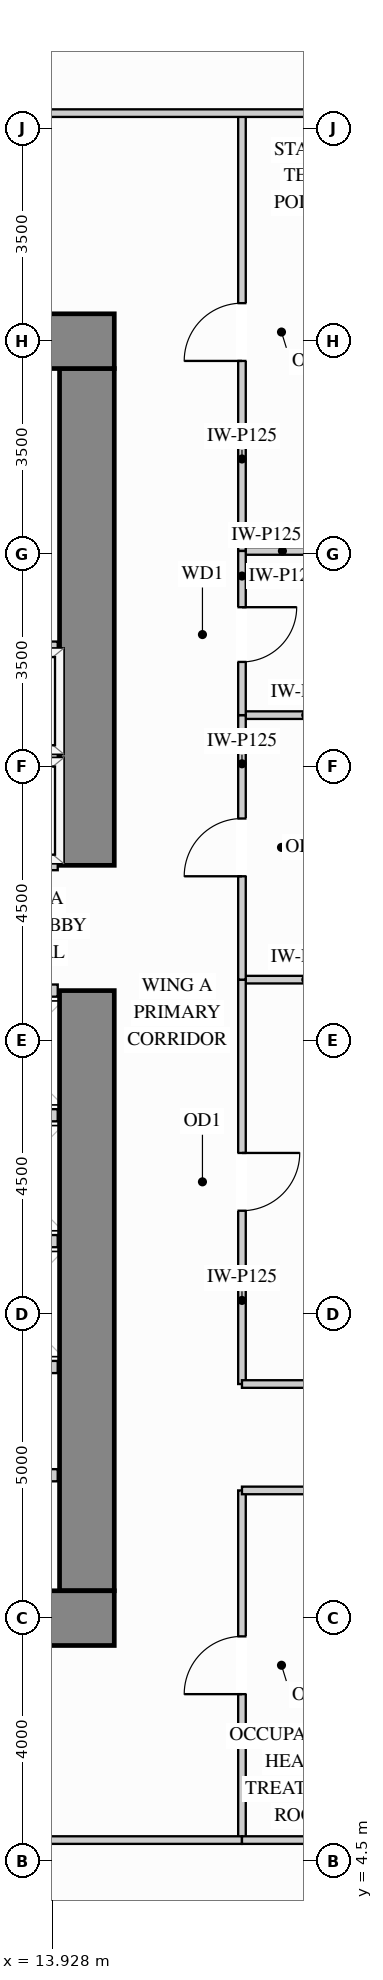
"""IFC4 building model, lengths in metres.
Left out: names, types, materials, properties, quantities, classifications, styles, units other than length and angle.
Written with IfcOpenShell. Run it as: python <this file> out.ifc"""

import sys

from ifc_helpers import new_model, si_unit, direction, frame, frame_2d, origin, place, context, subcontext, project, spatial, rectangle, extrude, source, transform, mapped, element, fill, save


model = new_model("IFC4")
c1 = context("Model", 3, precision=1e-05, world=origin(), true_north=direction((0.0, 1.0)))
c2 = subcontext(c1, "Body", "Model", "MODEL_VIEW")
j1 = project(units=[si_unit("LENGTHUNIT", "METRE"), si_unit("PLANEANGLEUNIT", "RADIAN")], contexts=[c1])
p1 = place(None, origin())
s1 = spatial("IfcSite", under=j1, at=p1, CompositionType="ELEMENT")
p2 = place(p1, origin())
s2 = spatial("IfcBuilding", under=s1, at=p2, CompositionType="ELEMENT")
p3 = place(p2, frame((0.0, 0.0, 54.9)))
s3 = spatial("IfcBuildingStorey", under=s2, at=p3, CompositionType="ELEMENT", Elevation=54.9)
m1 = source(origin(), c2, "Body", "SweptSolid", [
    extrude(rectangle(XDim=9.87, YDim=0.9, at=frame_2d((4.935, 0.0))), origin(), (0.0, 0.0, 1.0), 3.38),
])
p4 = place(p3, frame((14.5, 8.95, 0.0), z_axis=(0.0, 0.0, 1.0), x_axis=(0.0, 1.0, 0.0)))
e1 = element("IfcWall", 1, at=p4, inside=s3, PredefinedType="SHEAR", context=c2, shape_type="MappedRepresentation", body=[
    mapped(m1, transform((0.0, 0.0, 0.0), x_axis=(1.0, 0.0, 0.0), y_axis=(0.0, 1.0, 0.0), z_axis=(0.0, 0.0, 1.0))),
])
m2 = source(origin(), c2, "Body", "SweptSolid", [
    extrude(rectangle(XDim=8.17, YDim=0.9, at=frame_2d((4.085, 0.0))), origin(), (0.0, 0.0, 1.0), 3.38),
])
p5 = place(p3, frame((14.5, 20.88, 0.0), z_axis=(0.0, 0.0, 1.0), x_axis=(0.0, 1.0, 0.0)))
e2 = element("IfcWall", 2, at=p5, inside=s3, PredefinedType="SHEAR", context=c2, shape_type="MappedRepresentation", body=[
    mapped(m2, transform((0.0, 0.0, 0.0), x_axis=(1.0, 0.0, 0.0), y_axis=(0.0, 1.0, 0.0), z_axis=(0.0, 0.0, 1.0))),
])
m3 = source(origin(), c2, "Body", "SweptSolid", [
    extrude(rectangle(XDim=10.9, YDim=0.9, at=frame_2d((5.45, 0.0))), origin(), (0.0, 0.0, 1.0), 3.38),
])
for number, where, z_axis, x_axis in (
    (3, (4.05, 29.5, 0.0), (0.0, 0.0, 1.0), (1.0, 0.0, 0.0)),
    (4, (4.05, 8.5, 0.0), (0.0, 0.0, 1.0), (1.0, 0.0, 0.0)),
):
    element("IfcWall", number, at=place(p3, frame(where, z_axis=z_axis, x_axis=x_axis)), inside=s3, PredefinedType="SHEAR", context=c2, shape_type="MappedRepresentation", body=[
        mapped(m3, transform((0.0, 0.0, 0.0), x_axis=(1.0, 0.0, 0.0), y_axis=(0.0, 1.0, 0.0), z_axis=(0.0, 0.0, 1.0))),
    ])
m4 = source(origin(), c2, "Body", "SweptSolid", [
    extrude(rectangle(XDim=2.1, YDim=0.125, at=frame_2d((1.05, 0.0))), origin(), (0.0, 0.0, 1.0), 3.365),
])
p6 = place(p3, frame((17.05, 19.0, 0.0), z_axis=(0.0, 0.0, 1.0), x_axis=(1.0, 0.0, 0.0)))
e5 = element("IfcWall", 5, at=p6, inside=s3, PredefinedType="PARTITIONING", context=c2, shape_type="MappedRepresentation", body=[
    mapped(m4, transform((0.0, 0.0, 0.0), x_axis=(1.0, 0.0, 0.0), y_axis=(0.0, 1.0, 0.0), z_axis=(0.0, 0.0, 1.0))),
])
m5 = source(origin(), c2, "Body", "SweptSolid", [
    extrude(rectangle(XDim=2.098, YDim=0.125, at=frame_2d((1.049, 0.0))), origin(), (0.0, 0.0, 1.0), 3.365),
])
for number, where, z_axis, x_axis in (
    (6, (17.05, 23.35, 0.0), (0.0, 0.0, 1.0), (1.0, 0.0, 0.0)),
    (7, (17.05, 26.05, 0.0), (0.0, 0.0, 1.0), (1.0, 0.0, 0.0)),
):
    element("IfcWall", number, at=place(p3, frame(where, z_axis=z_axis, x_axis=x_axis)), inside=s3, PredefinedType="PARTITIONING", context=c2, shape_type="MappedRepresentation", body=[
        mapped(m5, transform((0.0, 0.0, 0.0), x_axis=(1.0, 0.0, 0.0), y_axis=(0.0, 1.0, 0.0), z_axis=(0.0, 0.0, 1.0))),
    ])
p7 = place(p3, frame((17.05, 12.35, 0.0), z_axis=(0.0, 0.0, 1.0), x_axis=(0.0, 1.0, 0.0)))
e8 = element("IfcWall", 8, at=p7, inside=s3, PredefinedType="PARTITIONING", context=c2, shape_type="SweptSolid", body=[
    extrude(rectangle(XDim=6.65, YDim=0.125, at=frame_2d((3.325, 0.0))), origin(), (0.0, 0.0, 1.0), 3.365),
])
p8 = place(p7, frame((2.85, 0.0, 0.0)))
e9 = element("IfcOpeningElement", 9, at=p8, cuts=e8, PredefinedType="OPENING", context=c2, shape_type="SweptSolid", body=[
    extrude(rectangle(XDim=0.95, YDim=2.15, at=frame_2d((0.475, 1.075))), frame((0.0, 0.073, 0.0), z_axis=(0.0, -1.0, 0.0), x_axis=(1.0, 0.0, 0.0)), (0.0, 0.0, 1.0), 0.145),
])
p9 = place(p3, frame((17.05, 19.0, 0.0), z_axis=(0.0, 0.0, 1.0), x_axis=(0.0, 1.0, 0.0)))
e10 = element("IfcWall", 10, at=p9, inside=s3, PredefinedType="PARTITIONING", context=c2, shape_type="SweptSolid", body=[
    extrude(rectangle(XDim=4.35, YDim=0.125, at=frame_2d((2.175, 0.0))), origin(), (0.0, 0.0, 1.0), 3.365),
])
p10 = place(p9, frame((1.7, 0.0, 0.0)))
e11 = element("IfcOpeningElement", 11, at=p10, cuts=e10, PredefinedType="OPENING", context=c2, shape_type="SweptSolid", body=[
    extrude(rectangle(XDim=0.95, YDim=2.15, at=frame_2d((0.475, 1.075))), frame((0.0, 0.073, 0.0), z_axis=(0.0, -1.0, 0.0), x_axis=(1.0, 0.0, 0.0)), (0.0, 0.0, 1.0), 0.145),
])
p11 = place(p3, frame((17.05, 26.05, 0.0), z_axis=(0.0, 0.0, 1.0), x_axis=(0.0, 1.0, 0.0)))
e12 = element("IfcWall", 12, at=p11, inside=s3, PredefinedType="PARTITIONING", context=c2, shape_type="SweptSolid", body=[
    extrude(rectangle(XDim=7.2, YDim=0.125, at=frame_2d((3.6, 0.0))), origin(), (0.0, 0.0, 1.0), 3.365),
])
p12 = place(p11, frame((3.125, 0.0, 0.0)))
e13 = element("IfcOpeningElement", 13, at=p12, cuts=e12, PredefinedType="OPENING", context=c2, shape_type="SweptSolid", body=[
    extrude(rectangle(XDim=0.95, YDim=2.15, at=frame_2d((0.475, 1.075))), frame((0.0, 0.073, 0.0), z_axis=(0.0, -1.0, 0.0), x_axis=(1.0, 0.0, 0.0)), (0.0, 0.0, 1.0), 0.145),
])
p13 = place(p3, frame((17.05, 4.85, 0.0), z_axis=(0.0, 0.0, 1.0), x_axis=(0.0, 1.0, 0.0)))
e14 = element("IfcWall", 14, at=p13, inside=s3, PredefinedType="PARTITIONING", context=c2, shape_type="SweptSolid", body=[
    extrude(rectangle(XDim=5.75, YDim=0.125, at=frame_2d((2.875, 0.0))), origin(), (0.0, 0.0, 1.0), 3.365),
])
p14 = place(p13, frame((2.4, 0.0, 0.0)))
e15 = element("IfcOpeningElement", 15, at=p14, cuts=e14, PredefinedType="OPENING", context=c2, shape_type="SweptSolid", body=[
    extrude(rectangle(XDim=0.95, YDim=2.15, at=frame_2d((0.475, 1.075))), frame((0.0, 0.073, 0.0), z_axis=(0.0, -1.0, 0.0), x_axis=(1.0, 0.0, 0.0)), (0.0, 0.0, 1.0), 0.145),
])
p15 = place(p3, frame((17.05, 23.35, 0.0), z_axis=(0.0, 0.0, 1.0), x_axis=(0.0, 1.0, 0.0)))
e16 = element("IfcWall", 16, at=p15, inside=s3, PredefinedType="PARTITIONING", context=c2, shape_type="SweptSolid", body=[
    extrude(rectangle(XDim=2.7, YDim=0.125, at=frame_2d((1.35, 0.0))), origin(), (0.0, 0.0, 1.0), 3.365),
])
p16 = place(p15, frame((0.875, 0.0, 0.0)))
e17 = element("IfcOpeningElement", 17, at=p16, cuts=e16, PredefinedType="OPENING", context=c2, shape_type="SweptSolid", body=[
    extrude(rectangle(XDim=0.9, YDim=2.15, at=frame_2d((0.45, 1.075))), frame((0.0, 0.073, 0.0), z_axis=(0.0, -1.0, 0.0), x_axis=(1.0, 0.0, 0.0)), (0.0, 0.0, 1.0), 0.145),
])
m6 = source(origin(), c2, "Body", "SweptSolid", [
    extrude(rectangle(XDim=7.498, YDim=0.125, at=frame_2d((3.749, 0.0))), origin(), (0.0, 0.0, 1.0), 2.828),
])
p17 = place(p3, frame((11.65, 33.25, 0.0), z_axis=(0.0, 0.0, 1.0), x_axis=(1.0, 0.0, 0.0)))
e18 = element("IfcWall", 18, at=p17, inside=s3, PredefinedType="PARTITIONING", context=c2, shape_type="MappedRepresentation", body=[
    mapped(m6, transform((0.0, 0.0, 0.0), x_axis=(1.0, 0.0, 0.0), y_axis=(0.0, 1.0, 0.0), z_axis=(0.0, 0.0, 1.0))),
])
m7 = source(origin(), c2, "Body", "SweptSolid", [
    extrude(rectangle(XDim=2.45, YDim=0.125, at=frame_2d((1.225, 0.0))), origin(), (0.0, 0.0, 1.0), 3.365),
])
for number, where, z_axis, x_axis in (
    (19, (17.05, 12.35, 0.0), (0.0, 0.0, 1.0), (1.0, 0.0, 0.0)),
    (20, (17.05, 10.6, 0.0), (0.0, 0.0, 1.0), (1.0, 0.0, 0.0)),
):
    element("IfcWall", number, at=place(p3, frame(where, z_axis=z_axis, x_axis=x_axis)), inside=s3, PredefinedType="PARTITIONING", context=c2, shape_type="MappedRepresentation", body=[
        mapped(m7, transform((0.0, 0.0, 0.0), x_axis=(1.0, 0.0, 0.0), y_axis=(0.0, 1.0, 0.0), z_axis=(0.0, 0.0, 1.0))),
    ])
p18 = place(p3, frame((2.45, 4.85, 0.0), z_axis=(0.0, 0.0, 1.0), x_axis=(1.0, 0.0, 0.0)))
e21 = element("IfcWall", 21, at=p18, inside=s3, PredefinedType="PARTITIONING", context=c2, shape_type="SweptSolid", body=[
    extrude(rectangle(XDim=14.6, YDim=0.125, at=frame_2d((7.3, 0.0))), origin(), (0.0, 0.0, 1.0), 2.828),
])
p19 = place(p18, frame((6.825, 0.0, 0.0)))
e22 = element("IfcOpeningElement", 22, at=p19, cuts=e21, PredefinedType="OPENING", context=c2, shape_type="SweptSolid", body=[
    extrude(rectangle(XDim=0.95, YDim=2.15, at=frame_2d((0.475, 1.075))), frame((0.0, 0.073, 0.0), z_axis=(0.0, -1.0, 0.0), x_axis=(1.0, 0.0, 0.0)), (0.0, 0.0, 1.0), 0.145),
])
m8 = source(origin(), c2, "Body", "SweptSolid", [
    extrude(rectangle(XDim=2.098, YDim=0.125, at=frame_2d((1.049, 0.0))), origin(), (0.0, 0.0, 1.0), 2.828),
])
p20 = place(p3, frame((17.05, 4.85, 0.0), z_axis=(0.0, 0.0, 1.0), x_axis=(1.0, 0.0, 0.0)))
e23 = element("IfcWall", 23, at=p20, inside=s3, PredefinedType="PARTITIONING", context=c2, shape_type="MappedRepresentation", body=[
    mapped(m8, transform((0.0, 0.0, 0.0), x_axis=(1.0, 0.0, 0.0), y_axis=(0.0, 1.0, 0.0), z_axis=(0.0, 0.0, 1.0))),
])
m9 = source(origin(), c2, "Body", "SweptSolid", [
    extrude(rectangle(XDim=1.6, YDim=0.2, at=frame_2d((0.8, 0.0))), origin(), (0.0, 0.0, 1.0), 3.365),
])
p21 = place(p3, frame((12.42, 10.85, 0.0), z_axis=(0.0, 0.0, 1.0), x_axis=(1.0, 0.0, 0.0)))
e24 = element("IfcWall", 24, at=p21, inside=s3, PredefinedType="PARTITIONING", context=c2, shape_type="MappedRepresentation", body=[
    mapped(m9, transform((0.0, 0.0, 0.0), x_axis=(1.0, 0.0, 0.0), y_axis=(0.0, 1.0, 0.0), z_axis=(0.0, 0.0, 1.0))),
])
m10 = source(origin(), c2, "Body", "SweptSolid", [
    extrude(rectangle(XDim=2.19, YDim=0.2, at=frame_2d((1.095, 0.0))), origin(), (0.0, 0.0, 1.0), 3.365),
])
for number, where, z_axis, x_axis in (
    (25, (11.83, 22.66, 0.0), (0.0, 0.0, 1.0), (1.0, 0.0, 0.0)),
    (26, (11.83, 20.9, 0.0), (0.0, 0.0, 1.0), (1.0, 0.0, 0.0)),
    (27, (11.83, 24.46, 0.0), (0.0, 0.0, 1.0), (1.0, 0.0, 0.0)),
):
    element("IfcWall", number, at=place(p3, frame(where, z_axis=z_axis, x_axis=x_axis)), inside=s3, PredefinedType="PARTITIONING", context=c2, shape_type="MappedRepresentation", body=[
        mapped(m10, transform((0.0, 0.0, 0.0), x_axis=(1.0, 0.0, 0.0), y_axis=(0.0, 1.0, 0.0), z_axis=(0.0, 0.0, 1.0))),
    ])
m11 = source(origin(), c2, "Body", "SweptSolid", [
    extrude(rectangle(XDim=1.79, YDim=0.2, at=frame_2d((0.895, 0.0))), origin(), (0.0, 0.0, 1.0), 3.365),
])
for number, where, z_axis, x_axis in (
    (28, (12.23, 14.7, 0.0), (0.0, 0.0, 1.0), (1.0, 0.0, 0.0)),
    (29, (12.23, 12.63, 0.0), (0.0, 0.0, 1.0), (1.0, 0.0, 0.0)),
    (30, (12.23, 16.77, 0.0), (0.0, 0.0, 1.0), (1.0, 0.0, 0.0)),
    (31, (12.23, 18.82, 0.0), (0.0, 0.0, 1.0), (1.0, 0.0, 0.0)),
):
    element("IfcWall", number, at=place(p3, frame(where, z_axis=z_axis, x_axis=x_axis)), inside=s3, PredefinedType="PARTITIONING", context=c2, shape_type="MappedRepresentation", body=[
        mapped(m11, transform((0.0, 0.0, 0.0), x_axis=(1.0, 0.0, 0.0), y_axis=(0.0, 1.0, 0.0), z_axis=(0.0, 0.0, 1.0))),
    ])
m12 = source(origin(), c2, "Body", "SweptSolid", [
    extrude(rectangle(XDim=0.95, YDim=2.15, at=frame_2d((0.475, 1.075))), frame((0.0, 0.025, 0.0), z_axis=(0.0, -1.0, 0.0), x_axis=(1.0, 0.0, 0.0)), (0.0, 0.0, 1.0), 0.05),
])
p22 = place(p14, origin())
e32 = element("IfcDoor", 32, at=p22, inside=s3, OperationType="SINGLE_SWING_LEFT", PredefinedType="DOOR", context=c2, shape_type="MappedRepresentation", body=[
    mapped(m12, transform((0.0, 0.0, 0.0), x_axis=(1.0, 0.0, 0.0), y_axis=(0.0, 1.0, 0.0), z_axis=(0.0, 0.0, 1.0))),
])
fill(e15, e32)
p23 = place(p8, origin())
e33 = element("IfcDoor", 33, at=p23, inside=s3, OperationType="SINGLE_SWING_RIGHT", PredefinedType="DOOR", context=c2, shape_type="MappedRepresentation", body=[
    mapped(m12, transform((0.0, 0.0, 0.0), x_axis=(1.0, 0.0, 0.0), y_axis=(0.0, 1.0, 0.0), z_axis=(0.0, 0.0, 1.0))),
])
fill(e9, e33)
p24 = place(p10, origin())
e34 = element("IfcDoor", 34, at=p24, inside=s3, OperationType="SINGLE_SWING_LEFT", PredefinedType="DOOR", context=c2, shape_type="MappedRepresentation", body=[
    mapped(m12, transform((0.0, 0.0, 0.0), x_axis=(1.0, 0.0, 0.0), y_axis=(0.0, 1.0, 0.0), z_axis=(0.0, 0.0, 1.0))),
])
fill(e11, e34)
p25 = place(p12, origin())
e35 = element("IfcDoor", 35, at=p25, inside=s3, OperationType="SINGLE_SWING_LEFT", PredefinedType="DOOR", context=c2, shape_type="MappedRepresentation", body=[
    mapped(m12, transform((0.0, 0.0, 0.0), x_axis=(1.0, 0.0, 0.0), y_axis=(0.0, 1.0, 0.0), z_axis=(0.0, 0.0, 1.0))),
])
fill(e13, e35)
m13 = source(origin(), c2, "Body", "SweptSolid", [
    extrude(rectangle(XDim=0.9, YDim=2.15, at=frame_2d((0.45, 1.075))), frame((0.0, 0.025, 0.0), z_axis=(0.0, -1.0, 0.0), x_axis=(1.0, 0.0, 0.0)), (0.0, 0.0, 1.0), 0.05),
])
p26 = place(p16, origin())
e36 = element("IfcDoor", 36, at=p26, inside=s3, OperationType="SINGLE_SWING_RIGHT", PredefinedType="DOOR", context=c2, shape_type="MappedRepresentation", body=[
    mapped(m13, transform((0.0, 0.0, 0.0), x_axis=(1.0, 0.0, 0.0), y_axis=(0.0, 1.0, 0.0), z_axis=(0.0, 0.0, 1.0))),
])
fill(e17, e36)
save(model, sys.argv[1])
